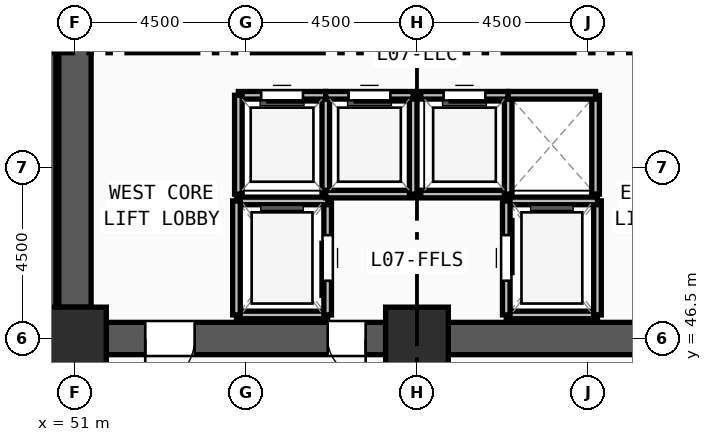
"""IFC4 building model, lengths in metres.
Left out: names, types, materials, properties, quantities, classifications, styles, units other than length and angle.
Written with IfcOpenShell. Run it as: python <this file> out.ifc"""

import sys

from ifc_helpers import new_model, si_unit, direction, frame, frame_2d, origin, origin_2d, place, context, subcontext, project, spatial, rectangle, extrude, source, transform, mapped, element, fill, save


model = new_model("IFC4")
c1 = context("Model", 3, precision=1e-05, world=origin(), true_north=direction((0.0, 1.0)))
c2 = subcontext(c1, "Body", "Model", "MODEL_VIEW")
j1 = project(units=[si_unit("LENGTHUNIT", "METRE"), si_unit("PLANEANGLEUNIT", "RADIAN")], contexts=[c1])
p1 = place(None, origin())
s1 = spatial("IfcSite", under=j1, at=p1, CompositionType="ELEMENT")
p2 = place(p1, origin())
s2 = spatial("IfcBuilding", under=s1, at=p2, CompositionType="ELEMENT")
p3 = place(p2, frame((0.0, 0.0, 28.5)))
s3 = spatial("IfcBuildingStorey", under=s2, at=p3, CompositionType="ELEMENT", Elevation=28.5)
m1 = source(origin(), c2, "Body", "SweptSolid", [
    extrude(rectangle(XDim=1.65, YDim=1.65, at=origin_2d()), origin(), (0.0, 0.0, 1.0), 3.75),
])
for number, where, z_axis, x_axis in (
    (1, (51.0, 46.5, 0.0), (0.0, 0.0, 1.0), (1.0, 0.0, 0.0)),
    (2, (60.0, 46.5, 0.0), (0.0, 0.0, 1.0), (1.0, 0.0, 0.0)),
):
    element("IfcColumn", number, at=place(p3, frame(where, z_axis=z_axis, x_axis=x_axis)), inside=s3, PredefinedType="COLUMN", context=c2, shape_type="MappedRepresentation", body=[
        mapped(m1, transform((0.0, 0.0, 0.0), x_axis=(1.0, 0.0, 0.0), y_axis=(0.0, 1.0, 0.0), z_axis=(0.0, 0.0, 1.0), scale=1.0)),
    ])
p4 = place(p3, frame((68.175, 46.5, 0.0), z_axis=(0.0, 0.0, 1.0), x_axis=(-1.0, 0.0, 0.0)))
e3 = element("IfcWall", 3, at=p4, inside=s3, PredefinedType="SHEAR", context=c2, shape_type="SweptSolid", body=[
    extrude(rectangle(XDim=7.35, YDim=0.85, at=frame_2d((3.675, 0.0))), origin(), (0.0, 0.0, 1.0), 3.57),
])
m2 = source(origin(), c2, "Body", "SweptSolid", [
    extrude(rectangle(XDim=1.3, YDim=2.2, at=frame_2d((0.65, 1.1))), frame((0.0, 0.435, 0.0), z_axis=(0.0, -1.0, 0.0), x_axis=(1.0, 0.0, 0.0)), (0.0, 0.0, 1.0), 0.87),
])
p5 = place(p4, frame((1.025, 0.0, 0.0)))
e4 = element("IfcOpeningElement", 4, at=p5, cuts=e3, PredefinedType="OPENING", context=c2, shape_type="MappedRepresentation", body=[
    mapped(m2, transform((0.0, 0.0, 0.0), x_axis=(1.0, 0.0, 0.0), y_axis=(0.0, 1.0, 0.0), z_axis=(0.0, 0.0, 1.0), scale=1.0)),
])
p6 = place(p3, frame((59.175, 46.5, 0.0), z_axis=(0.0, 0.0, 1.0), x_axis=(-1.0, 0.0, 0.0)))
e5 = element("IfcWall", 5, at=p6, inside=s3, PredefinedType="SHEAR", context=c2, shape_type="SweptSolid", body=[
    extrude(rectangle(XDim=7.35, YDim=0.85, at=frame_2d((3.675, 0.0))), origin(), (0.0, 0.0, 1.0), 3.57),
])
p7 = place(p6, frame((5.025, 0.0, 0.0)))
e6 = element("IfcOpeningElement", 6, at=p7, cuts=e5, PredefinedType="OPENING", context=c2, shape_type="MappedRepresentation", body=[
    mapped(m2, transform((0.0, 0.0, 0.0), x_axis=(1.0, 0.0, 0.0), y_axis=(0.0, 1.0, 0.0), z_axis=(0.0, 0.0, 1.0), scale=1.0)),
])
m3 = source(origin(), c2, "Body", "SweptSolid", [
    extrude(rectangle(XDim=1.0, YDim=2.2, at=frame_2d((0.5, 1.1))), frame((0.0, 0.435, 0.0), z_axis=(0.0, -1.0, 0.0), x_axis=(1.0, 0.0, 0.0)), (0.0, 0.0, 1.0), 0.87),
])
p8 = place(p6, frame((0.525, 0.0, 0.0)))
e7 = element("IfcOpeningElement", 7, at=p8, cuts=e5, PredefinedType="OPENING", context=c2, shape_type="MappedRepresentation", body=[
    mapped(m3, transform((0.0, 0.0, 0.0), x_axis=(1.0, 0.0, 0.0), y_axis=(0.0, 1.0, 0.0), z_axis=(0.0, 0.0, 1.0), scale=1.0)),
])
p9 = place(p3, frame((51.0, 47.325, 0.0), z_axis=(0.0, 0.0, 1.0), x_axis=(0.0, 1.0, 0.0)))
e8 = element("IfcWall", 8, at=p9, inside=s3, PredefinedType="SHEAR", context=c2, shape_type="SweptSolid", body=[
    extrude(rectangle(XDim=13.35, YDim=0.85, at=frame_2d((6.675, 0.0))), origin(), (0.0, 0.0, 1.0), 3.57),
])
p10 = place(p3, frame((50.38, 46.7, 0.0), z_axis=(0.0, 0.0, 1.0), x_axis=(0.0, 1.0, 0.0)))
e9 = element("IfcWall", 9, at=p10, inside=s3, PredefinedType="SOLIDWALL", context=c2, shape_type="SweptSolid", body=[
    extrude(rectangle(XDim=7.82, YDim=0.24, at=frame_2d((3.91, 0.0))), origin(), (0.0, 0.0, 1.0), 3.57),
])
p11 = place(p3, frame((55.25, 47.12, 0.0), z_axis=(0.0, 0.0, 1.0), x_axis=(1.0, 0.0, 0.0)))
e10 = element("IfcWall", 10, at=p11, inside=s3, PredefinedType="SOLIDWALL", context=c2, shape_type="SweptSolid", body=[
    extrude(rectangle(XDim=2.4, YDim=0.2, at=frame_2d((1.2, 0.0))), origin(), (0.0, 0.0, 1.0), 3.57),
])
p12 = place(p3, frame((57.65, 47.12, 0.0), z_axis=(0.0, 0.0, 1.0), x_axis=(0.0, 1.0, 0.0)))
e11 = element("IfcWall", 11, at=p12, inside=s3, PredefinedType="SOLIDWALL", context=c2, shape_type="SweptSolid", body=[
    extrude(rectangle(XDim=3.0, YDim=0.2, at=frame_2d((1.5, 0.0))), origin(), (0.0, 0.0, 1.0), 3.57),
])
m4 = source(origin(), c2, "Body", "SweptSolid", [
    extrude(rectangle(XDim=1.2, YDim=2.3, at=frame_2d((0.6, 1.15))), frame((0.0, 0.11, 0.0), z_axis=(0.0, -1.0, 0.0), x_axis=(1.0, 0.0, 0.0)), (0.0, 0.0, 1.0), 0.22),
])
p13 = place(p12, frame((0.9, 0.0, 0.0)))
e12 = element("IfcOpeningElement", 12, at=p13, cuts=e11, PredefinedType="OPENING", context=c2, shape_type="MappedRepresentation", body=[
    mapped(m4, transform((0.0, 0.0, 0.0), x_axis=(1.0, 0.0, 0.0), y_axis=(0.0, 1.0, 0.0), z_axis=(0.0, 0.0, 1.0), scale=1.0)),
])
p14 = place(p3, frame((57.65, 50.12, 0.0), z_axis=(0.0, 0.0, 1.0), x_axis=(-1.0, 0.0, 0.0)))
e13 = element("IfcWall", 13, at=p14, inside=s3, PredefinedType="SOLIDWALL", context=c2, shape_type="SweptSolid", body=[
    extrude(rectangle(XDim=2.4, YDim=0.2, at=frame_2d((1.2, 0.0))), origin(), (0.0, 0.0, 1.0), 3.57),
])
p15 = place(p3, frame((55.25, 50.12, 0.0), z_axis=(0.0, 0.0, 1.0), x_axis=(0.0, -1.0, 0.0)))
e14 = element("IfcWall", 14, at=p15, inside=s3, PredefinedType="SOLIDWALL", context=c2, shape_type="SweptSolid", body=[
    extrude(rectangle(XDim=3.0, YDim=0.2, at=frame_2d((1.5, 0.0))), origin(), (0.0, 0.0, 1.0), 3.57),
])
p16 = place(p3, frame((62.35, 47.12, 0.0), z_axis=(0.0, 0.0, 1.0), x_axis=(1.0, 0.0, 0.0)))
e15 = element("IfcWall", 15, at=p16, inside=s3, PredefinedType="SOLIDWALL", context=c2, shape_type="SweptSolid", body=[
    extrude(rectangle(XDim=2.4, YDim=0.2, at=frame_2d((1.2, 0.0))), origin(), (0.0, 0.0, 1.0), 3.57),
])
p17 = place(p3, frame((64.75, 47.12, 0.0), z_axis=(0.0, 0.0, 1.0), x_axis=(0.0, 1.0, 0.0)))
e16 = element("IfcWall", 16, at=p17, inside=s3, PredefinedType="SOLIDWALL", context=c2, shape_type="SweptSolid", body=[
    extrude(rectangle(XDim=3.0, YDim=0.2, at=frame_2d((1.5, 0.0))), origin(), (0.0, 0.0, 1.0), 3.57),
])
p18 = place(p3, frame((64.75, 50.12, 0.0), z_axis=(0.0, 0.0, 1.0), x_axis=(-1.0, 0.0, 0.0)))
e17 = element("IfcWall", 17, at=p18, inside=s3, PredefinedType="SOLIDWALL", context=c2, shape_type="SweptSolid", body=[
    extrude(rectangle(XDim=2.4, YDim=0.2, at=frame_2d((1.2, 0.0))), origin(), (0.0, 0.0, 1.0), 3.57),
])
p19 = place(p3, frame((62.35, 50.12, 0.0), z_axis=(0.0, 0.0, 1.0), x_axis=(0.0, -1.0, 0.0)))
e18 = element("IfcWall", 18, at=p19, inside=s3, PredefinedType="SOLIDWALL", context=c2, shape_type="SweptSolid", body=[
    extrude(rectangle(XDim=3.0, YDim=0.2, at=frame_2d((1.5, 0.0))), origin(), (0.0, 0.0, 1.0), 3.57),
])
p20 = place(p19, frame((0.9, 0.0, 0.0)))
e19 = element("IfcOpeningElement", 19, at=p20, cuts=e18, PredefinedType="OPENING", context=c2, shape_type="MappedRepresentation", body=[
    mapped(m4, transform((0.0, 0.0, 0.0), x_axis=(1.0, 0.0, 0.0), y_axis=(0.0, 1.0, 0.0), z_axis=(0.0, 0.0, 1.0), scale=1.0)),
])
p21 = place(p3, frame((57.6, 50.3, 0.0), z_axis=(0.0, 0.0, 1.0), x_axis=(0.0, 1.0, 0.0)))
e20 = element("IfcWall", 20, at=p21, inside=s3, PredefinedType="SOLIDWALL", context=c2, shape_type="SweptSolid", body=[
    extrude(rectangle(XDim=2.6, YDim=0.2, at=frame_2d((1.3, 0.0))), origin(), (0.0, 0.0, 1.0), 3.57),
])
p22 = place(p3, frame((57.6, 52.9, 0.0), z_axis=(0.0, 0.0, 1.0), x_axis=(-1.0, 0.0, 0.0)))
e21 = element("IfcWall", 21, at=p22, inside=s3, PredefinedType="SOLIDWALL", context=c2, shape_type="SweptSolid", body=[
    extrude(rectangle(XDim=2.3, YDim=0.2, at=frame_2d((1.15, 0.0))), origin(), (0.0, 0.0, 1.0), 3.57),
])
m5 = source(origin(), c2, "Body", "SweptSolid", [
    extrude(rectangle(XDim=1.1, YDim=2.2, at=frame_2d((0.55, 1.1))), frame((0.0, 0.11, 0.0), z_axis=(0.0, -1.0, 0.0), x_axis=(1.0, 0.0, 0.0)), (0.0, 0.0, 1.0), 0.22),
])
p23 = place(p22, frame((0.6, 0.0, 0.0)))
e22 = element("IfcOpeningElement", 22, at=p23, cuts=e21, PredefinedType="OPENING", context=c2, shape_type="MappedRepresentation", body=[
    mapped(m5, transform((0.0, 0.0, 0.0), x_axis=(1.0, 0.0, 0.0), y_axis=(0.0, 1.0, 0.0), z_axis=(0.0, 0.0, 1.0), scale=1.0)),
])
p24 = place(p3, frame((55.3, 52.9, 0.0), z_axis=(0.0, 0.0, 1.0), x_axis=(0.0, -1.0, 0.0)))
e23 = element("IfcWall", 23, at=p24, inside=s3, PredefinedType="SOLIDWALL", context=c2, shape_type="SweptSolid", body=[
    extrude(rectangle(XDim=2.6, YDim=0.2, at=frame_2d((1.3, 0.0))), origin(), (0.0, 0.0, 1.0), 3.57),
])
p25 = place(p3, frame((57.6, 50.3, 0.0), z_axis=(0.0, 0.0, 1.0), x_axis=(1.0, 0.0, 0.0)))
e24 = element("IfcWall", 24, at=p25, inside=s3, PredefinedType="SOLIDWALL", context=c2, shape_type="SweptSolid", body=[
    extrude(rectangle(XDim=2.3, YDim=0.2, at=frame_2d((1.15, 0.0))), origin(), (0.0, 0.0, 1.0), 3.57),
])
p26 = place(p3, frame((59.9, 50.3, 0.0), z_axis=(0.0, 0.0, 1.0), x_axis=(0.0, 1.0, 0.0)))
e25 = element("IfcWall", 25, at=p26, inside=s3, PredefinedType="SOLIDWALL", context=c2, shape_type="SweptSolid", body=[
    extrude(rectangle(XDim=2.6, YDim=0.2, at=frame_2d((1.3, 0.0))), origin(), (0.0, 0.0, 1.0), 3.57),
])
p27 = place(p3, frame((59.9, 52.9, 0.0), z_axis=(0.0, 0.0, 1.0), x_axis=(-1.0, 0.0, 0.0)))
e26 = element("IfcWall", 26, at=p27, inside=s3, PredefinedType="SOLIDWALL", context=c2, shape_type="SweptSolid", body=[
    extrude(rectangle(XDim=2.3, YDim=0.2, at=frame_2d((1.15, 0.0))), origin(), (0.0, 0.0, 1.0), 3.57),
])
p28 = place(p27, frame((0.6, 0.0, 0.0)))
e27 = element("IfcOpeningElement", 27, at=p28, cuts=e26, PredefinedType="OPENING", context=c2, shape_type="MappedRepresentation", body=[
    mapped(m5, transform((0.0, 0.0, 0.0), x_axis=(1.0, 0.0, 0.0), y_axis=(0.0, 1.0, 0.0), z_axis=(0.0, 0.0, 1.0), scale=1.0)),
])
p29 = place(p3, frame((60.1, 50.3, 0.0), z_axis=(0.0, 0.0, 1.0), x_axis=(1.0, 0.0, 0.0)))
e28 = element("IfcWall", 28, at=p29, inside=s3, PredefinedType="SOLIDWALL", context=c2, shape_type="SweptSolid", body=[
    extrude(rectangle(XDim=2.3, YDim=0.2, at=frame_2d((1.15, 0.0))), origin(), (0.0, 0.0, 1.0), 3.57),
])
p30 = place(p3, frame((62.4, 50.3, 0.0), z_axis=(0.0, 0.0, 1.0), x_axis=(0.0, 1.0, 0.0)))
e29 = element("IfcWall", 29, at=p30, inside=s3, PredefinedType="SOLIDWALL", context=c2, shape_type="SweptSolid", body=[
    extrude(rectangle(XDim=2.6, YDim=0.2, at=frame_2d((1.3, 0.0))), origin(), (0.0, 0.0, 1.0), 3.57),
])
p31 = place(p3, frame((62.4, 52.9, 0.0), z_axis=(0.0, 0.0, 1.0), x_axis=(-1.0, 0.0, 0.0)))
e30 = element("IfcWall", 30, at=p31, inside=s3, PredefinedType="SOLIDWALL", context=c2, shape_type="SweptSolid", body=[
    extrude(rectangle(XDim=2.3, YDim=0.2, at=frame_2d((1.15, 0.0))), origin(), (0.0, 0.0, 1.0), 3.57),
])
p32 = place(p31, frame((0.6, 0.0, 0.0)))
e31 = element("IfcOpeningElement", 31, at=p32, cuts=e30, PredefinedType="OPENING", context=c2, shape_type="MappedRepresentation", body=[
    mapped(m5, transform((0.0, 0.0, 0.0), x_axis=(1.0, 0.0, 0.0), y_axis=(0.0, 1.0, 0.0), z_axis=(0.0, 0.0, 1.0), scale=1.0)),
])
p33 = place(p3, frame((64.7, 50.3, 0.0), z_axis=(0.0, 0.0, 1.0), x_axis=(0.0, 1.0, 0.0)))
e32 = element("IfcWall", 32, at=p33, inside=s3, PredefinedType="SOLIDWALL", context=c2, shape_type="SweptSolid", body=[
    extrude(rectangle(XDim=2.6, YDim=0.2, at=frame_2d((1.3, 0.0))), origin(), (0.0, 0.0, 1.0), 3.57),
])
p34 = place(p3, frame((64.7, 52.9, 0.0), z_axis=(0.0, 0.0, 1.0), x_axis=(-1.0, 0.0, 0.0)))
e33 = element("IfcWall", 33, at=p34, inside=s3, PredefinedType="SOLIDWALL", context=c2, shape_type="SweptSolid", body=[
    extrude(rectangle(XDim=2.3, YDim=0.2, at=frame_2d((1.15, 0.0))), origin(), (0.0, 0.0, 1.0), 3.57),
])
m6 = source(origin(), c2, "Body", "SweptSolid", [
    extrude(rectangle(XDim=1.3, YDim=2.2, at=frame_2d((0.65, 1.1))), frame((0.0, 0.025, 0.0), z_axis=(0.0, -1.0, 0.0), x_axis=(1.0, 0.0, 0.0)), (0.0, 0.0, 1.0), 0.05),
])
p35 = place(p7, origin())
e34 = element("IfcDoor", 34, at=p35, inside=s3, OperationType="SINGLE_SWING_RIGHT", PredefinedType="DOOR", context=c2, shape_type="MappedRepresentation", body=[
    mapped(m6, transform((0.0, 0.0, 0.0), x_axis=(1.0, 0.0, 0.0), y_axis=(0.0, 1.0, 0.0), z_axis=(0.0, 0.0, 1.0), scale=1.0)),
])
fill(e6, e34)
m7 = source(origin(), c2, "Body", "SweptSolid", [
    extrude(rectangle(XDim=1.0, YDim=2.2, at=frame_2d((0.5, 1.1))), frame((0.0, 0.025, 0.0), z_axis=(0.0, -1.0, 0.0), x_axis=(1.0, 0.0, 0.0)), (0.0, 0.0, 1.0), 0.05),
])
p36 = place(p8, origin())
e35 = element("IfcDoor", 35, at=p36, inside=s3, OperationType="SINGLE_SWING_LEFT", PredefinedType="DOOR", context=c2, shape_type="MappedRepresentation", body=[
    mapped(m7, transform((0.0, 0.0, 0.0), x_axis=(1.0, 0.0, 0.0), y_axis=(0.0, 1.0, 0.0), z_axis=(0.0, 0.0, 1.0), scale=1.0)),
])
fill(e7, e35)
m8 = source(origin(), c2, "Body", "SweptSolid", [
    extrude(rectangle(XDim=1.2, YDim=2.3, at=frame_2d((0.6, 1.15))), frame((0.0, 0.025, 0.0), z_axis=(0.0, -1.0, 0.0), x_axis=(1.0, 0.0, 0.0)), (0.0, 0.0, 1.0), 0.05),
])
p37 = place(p13, origin())
e36 = element("IfcDoor", 36, at=p37, inside=s3, OperationType="SLIDING_TO_LEFT", PredefinedType="DOOR", context=c2, shape_type="MappedRepresentation", body=[
    mapped(m8, transform((0.0, 0.0, 0.0), x_axis=(1.0, 0.0, 0.0), y_axis=(0.0, 1.0, 0.0), z_axis=(0.0, 0.0, 1.0), scale=1.0)),
])
fill(e12, e36)
p38 = place(p20, origin())
e37 = element("IfcDoor", 37, at=p38, inside=s3, OperationType="SLIDING_TO_LEFT", PredefinedType="DOOR", context=c2, shape_type="MappedRepresentation", body=[
    mapped(m8, transform((0.0, 0.0, 0.0), x_axis=(1.0, 0.0, 0.0), y_axis=(0.0, 1.0, 0.0), z_axis=(0.0, 0.0, 1.0), scale=1.0)),
])
fill(e19, e37)
m9 = source(origin(), c2, "Body", "SweptSolid", [
    extrude(rectangle(XDim=1.1, YDim=2.2, at=frame_2d((0.55, 1.1))), frame((0.0, 0.025, 0.0), z_axis=(0.0, -1.0, 0.0), x_axis=(1.0, 0.0, 0.0)), (0.0, 0.0, 1.0), 0.05),
])
p39 = place(p23, origin())
e38 = element("IfcDoor", 38, at=p39, inside=s3, OperationType="SLIDING_TO_LEFT", PredefinedType="DOOR", context=c2, shape_type="MappedRepresentation", body=[
    mapped(m9, transform((0.0, 0.0, 0.0), x_axis=(1.0, 0.0, 0.0), y_axis=(0.0, 1.0, 0.0), z_axis=(0.0, 0.0, 1.0), scale=1.0)),
])
fill(e22, e38)
p40 = place(p28, origin())
e39 = element("IfcDoor", 39, at=p40, inside=s3, OperationType="SLIDING_TO_LEFT", PredefinedType="DOOR", context=c2, shape_type="MappedRepresentation", body=[
    mapped(m9, transform((0.0, 0.0, 0.0), x_axis=(1.0, 0.0, 0.0), y_axis=(0.0, 1.0, 0.0), z_axis=(0.0, 0.0, 1.0), scale=1.0)),
])
fill(e27, e39)
p41 = place(p32, origin())
e40 = element("IfcDoor", 40, at=p41, inside=s3, OperationType="SLIDING_TO_LEFT", PredefinedType="DOOR", context=c2, shape_type="MappedRepresentation", body=[
    mapped(m9, transform((0.0, 0.0, 0.0), x_axis=(1.0, 0.0, 0.0), y_axis=(0.0, 1.0, 0.0), z_axis=(0.0, 0.0, 1.0), scale=1.0)),
])
fill(e31, e40)
save(model, sys.argv[1])
